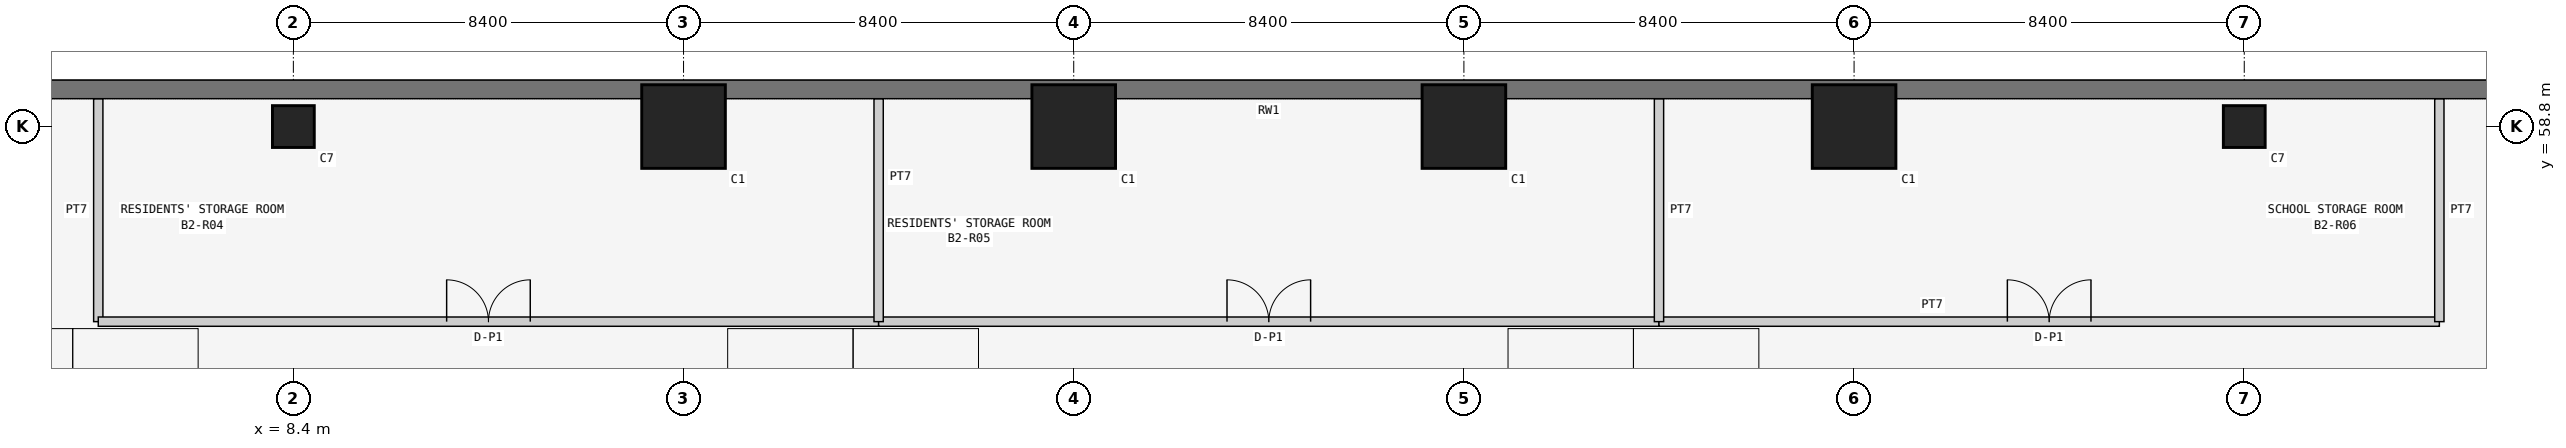
"""IFC4 building model, lengths in metres.
Left out: names, types, materials, properties, quantities, classifications, styles, units other than length and angle.
Written with IfcOpenShell. Run it as: python <this file> out.ifc"""

import sys

from ifc_helpers import new_model, si_unit, direction, frame, frame_2d, origin, origin_2d, place, context, subcontext, project, spatial, rectangle, extrude, element, fill, save


model = new_model("IFC4")
c1 = context("Model", 3, precision=1e-05, world=origin(), true_north=direction((0.0, 1.0)))
c2 = subcontext(c1, "Body", "Model", "MODEL_VIEW")
j1 = project(units=[si_unit("LENGTHUNIT", "METRE"), si_unit("PLANEANGLEUNIT", "RADIAN")], contexts=[c1])
p1 = place(None, origin())
s1 = spatial("IfcSite", under=j1, at=p1, CompositionType="ELEMENT")
p2 = place(p1, origin())
s2 = spatial("IfcBuilding", under=s1, at=p2, CompositionType="ELEMENT")
p3 = place(p2, frame((0.0, 0.0, -7.2)))
s3 = spatial("IfcBuildingStorey", under=s2, at=p3, CompositionType="ELEMENT", Elevation=-7.2)
p4 = place(p3, frame((8.4, 58.8, -0.4), z_axis=(0.0, 0.0, 1.0), x_axis=(1.0, 0.0, 0.0)))
e1 = element("IfcColumn", 1, at=p4, inside=s3, PredefinedType="COLUMN", context=c2, shape_type="SweptSolid", body=[
    extrude(rectangle(XDim=0.9, YDim=0.9, at=origin_2d()), origin(), (0.0, 0.0, 1.0), 4.0),
])
for number, where, z_axis, x_axis in (
    (2, (16.8, 58.8, -0.4), (0.0, 0.0, 1.0), (1.0, 0.0, 0.0)),
    (3, (25.2, 58.8, -0.4), (0.0, 0.0, 1.0), (1.0, 0.0, 0.0)),
    (4, (33.6, 58.8, -0.4), (0.0, 0.0, 1.0), (1.0, 0.0, 0.0)),
    (5, (42.0, 58.8, -0.4), (0.0, 0.0, 1.0), (1.0, 0.0, 0.0)),
):
    element("IfcColumn", number, at=place(p3, frame(where, z_axis=z_axis, x_axis=x_axis)), inside=s3, PredefinedType="COLUMN", context=c2, shape_type="SweptSolid", body=[
        extrude(rectangle(XDim=1.8, YDim=1.8, at=origin_2d()), origin(), (0.0, 0.0, 1.0), 4.0),
    ])
p5 = place(p3, frame((50.4, 58.8, -0.4), z_axis=(0.0, 0.0, 1.0), x_axis=(1.0, 0.0, 0.0)))
e6 = element("IfcColumn", 6, at=p5, inside=s3, PredefinedType="COLUMN", context=c2, shape_type="SweptSolid", body=[
    extrude(rectangle(XDim=0.9, YDim=0.9, at=origin_2d()), origin(), (0.0, 0.0, 1.0), 4.0),
])
p6 = place(p3, frame((58.4, 59.6, -0.4), z_axis=(0.0, 0.0, 1.0), x_axis=(-1.0, 0.0, 0.0)))
e7 = element("IfcWall", 7, at=p6, inside=s3, PredefinedType="SOLIDWALL", context=c2, shape_type="SweptSolid", body=[
    extrude(rectangle(XDim=58.0, YDim=0.4, at=frame_2d((29.0, 0.0))), origin(), (0.0, 0.0, 1.0), 4.0),
])
p7 = place(p3, frame((4.2, 59.4, 0.0), z_axis=(0.0, 0.0, 1.0), x_axis=(0.0, -1.0, 0.0)))
e8 = element("IfcWall", 8, at=p7, inside=s3, PredefinedType="PARTITIONING", context=c2, shape_type="SweptSolid", body=[
    extrude(rectangle(XDim=4.8, YDim=0.2, at=frame_2d((2.4, 0.0))), origin(), (0.0, 0.0, 1.0), 2.738),
])
p8 = place(p3, frame((4.2, 54.6, 0.0), z_axis=(0.0, 0.0, 1.0), x_axis=(1.0, 0.0, 0.0)))
e9 = element("IfcWall", 9, at=p8, inside=s3, PredefinedType="PARTITIONING", context=c2, shape_type="SweptSolid", body=[
    extrude(rectangle(XDim=16.8, YDim=0.2, at=frame_2d((8.4, 0.0))), origin(), (0.0, 0.0, 1.0), 3.35),
])
p9 = place(p8, frame((7.5, 0.0, 0.0)))
e10 = element("IfcOpeningElement", 10, at=p9, cuts=e9, PredefinedType="OPENING", context=c2, shape_type="SweptSolid", body=[
    extrude(rectangle(XDim=1.8, YDim=2.4, at=frame_2d((0.9, 1.2))), frame((0.0, 0.11, 0.0), z_axis=(0.0, -1.0, 0.0), x_axis=(1.0, 0.0, 0.0)), (0.0, 0.0, 1.0), 0.22),
])
p10 = place(p3, frame((21.0, 54.6, 0.0), z_axis=(0.0, 0.0, 1.0), x_axis=(1.0, 0.0, 0.0)))
e11 = element("IfcWall", 11, at=p10, inside=s3, PredefinedType="PARTITIONING", context=c2, shape_type="SweptSolid", body=[
    extrude(rectangle(XDim=16.8, YDim=0.2, at=frame_2d((8.4, 0.0))), origin(), (0.0, 0.0, 1.0), 3.35),
])
p11 = place(p10, frame((7.5, 0.0, 0.0)))
e12 = element("IfcOpeningElement", 12, at=p11, cuts=e11, PredefinedType="OPENING", context=c2, shape_type="SweptSolid", body=[
    extrude(rectangle(XDim=1.8, YDim=2.4, at=frame_2d((0.9, 1.2))), frame((0.0, 0.11, 0.0), z_axis=(0.0, -1.0, 0.0), x_axis=(1.0, 0.0, 0.0)), (0.0, 0.0, 1.0), 0.22),
])
p12 = place(p3, frame((37.8, 54.6, 0.0), z_axis=(0.0, 0.0, 1.0), x_axis=(1.0, 0.0, 0.0)))
e13 = element("IfcWall", 13, at=p12, inside=s3, PredefinedType="PARTITIONING", context=c2, shape_type="SweptSolid", body=[
    extrude(rectangle(XDim=16.8, YDim=0.2, at=frame_2d((8.4, 0.0))), origin(), (0.0, 0.0, 1.0), 3.35),
])
p13 = place(p12, frame((7.5, 0.0, 0.0)))
e14 = element("IfcOpeningElement", 14, at=p13, cuts=e13, PredefinedType="OPENING", context=c2, shape_type="SweptSolid", body=[
    extrude(rectangle(XDim=1.8, YDim=2.4, at=frame_2d((0.9, 1.2))), frame((0.0, 0.11, 0.0), z_axis=(0.0, -1.0, 0.0), x_axis=(1.0, 0.0, 0.0)), (0.0, 0.0, 1.0), 0.22),
])
for number, where, z_axis, x_axis in (
    (15, (54.6, 54.6, 0.0), (0.0, 0.0, 1.0), (0.0, 1.0, 0.0)),
    (16, (21.0, 59.4, 0.0), (0.0, 0.0, 1.0), (0.0, -1.0, 0.0)),
    (17, (37.8, 59.4, 0.0), (0.0, 0.0, 1.0), (0.0, -1.0, 0.0)),
):
    element("IfcWall", number, at=place(p3, frame(where, z_axis=z_axis, x_axis=x_axis)), inside=s3, PredefinedType="PARTITIONING", context=c2, shape_type="SweptSolid", body=[
        extrude(rectangle(XDim=4.8, YDim=0.2, at=frame_2d((2.4, 0.0))), origin(), (0.0, 0.0, 1.0), 2.738),
    ])
p14 = place(p9, origin())
e18 = element("IfcDoor", 18, at=p14, inside=s3, OperationType="DOUBLE_DOOR_SINGLE_SWING", PredefinedType="DOOR", context=c2, shape_type="SweptSolid", body=[
    extrude(rectangle(XDim=1.8, YDim=2.4, at=frame_2d((0.9, 1.2))), frame((0.0, 0.025, 0.0), z_axis=(0.0, -1.0, 0.0), x_axis=(1.0, 0.0, 0.0)), (0.0, 0.0, 1.0), 0.05),
])
fill(e10, e18)
p15 = place(p11, origin())
e19 = element("IfcDoor", 19, at=p15, inside=s3, OperationType="DOUBLE_DOOR_SINGLE_SWING", PredefinedType="DOOR", context=c2, shape_type="SweptSolid", body=[
    extrude(rectangle(XDim=1.8, YDim=2.4, at=frame_2d((0.9, 1.2))), frame((0.0, 0.025, 0.0), z_axis=(0.0, -1.0, 0.0), x_axis=(1.0, 0.0, 0.0)), (0.0, 0.0, 1.0), 0.05),
])
fill(e12, e19)
p16 = place(p13, origin())
e20 = element("IfcDoor", 20, at=p16, inside=s3, OperationType="DOUBLE_DOOR_SINGLE_SWING", PredefinedType="DOOR", context=c2, shape_type="SweptSolid", body=[
    extrude(rectangle(XDim=1.8, YDim=2.4, at=frame_2d((0.9, 1.2))), frame((0.0, 0.025, 0.0), z_axis=(0.0, -1.0, 0.0), x_axis=(1.0, 0.0, 0.0)), (0.0, 0.0, 1.0), 0.05),
])
fill(e14, e20)
save(model, sys.argv[1])
